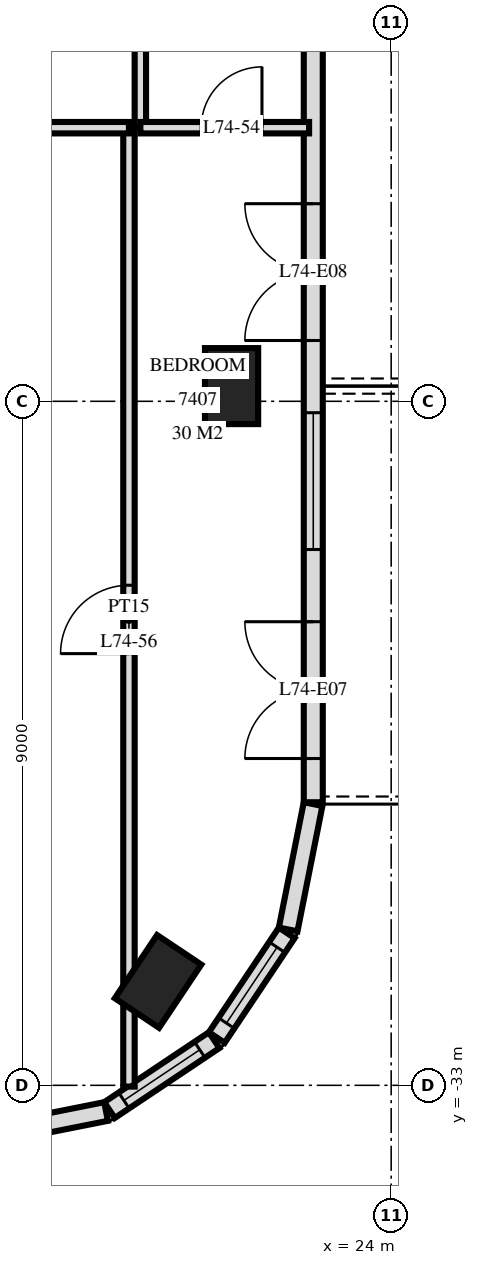
"""IFC4 building model, lengths in metres.
Left out: names, types, materials, properties, quantities, classifications, styles, units other than length and angle.
Written with IfcOpenShell. Run it as: python <this file> out.ifc"""

import sys

from ifc_helpers import new_model, si_unit, direction, frame, frame_2d, origin, origin_2d, place, context, subcontext, project, spatial, rectangle, extrude, element, fill, save


model = new_model("IFC4")
c1 = context("Model", 3, precision=1e-05, world=origin(), true_north=direction((0.0, 1.0)))
c2 = subcontext(c1, "Body", "Model", "MODEL_VIEW")
j1 = project(units=[si_unit("LENGTHUNIT", "METRE"), si_unit("PLANEANGLEUNIT", "RADIAN")], contexts=[c1])
p1 = place(None, origin())
s1 = spatial("IfcSite", under=j1, at=p1, CompositionType="ELEMENT")
p2 = place(p1, origin())
s2 = spatial("IfcBuilding", under=s1, at=p2, CompositionType="ELEMENT")
p3 = place(p2, frame((0.0, 0.0, 280.6)))
s3 = spatial("IfcBuildingStorey", under=s2, at=p3, CompositionType="ELEMENT", Elevation=280.6)
for number, where, z_axis, x_axis in (
    (1, (20.933, -31.633, 0.0), (0.0, 0.0, 1.0), (0.556, 0.831, 0.0)),
    (2, (21.9, -23.8, 0.0), (0.0, 0.0, 1.0), (0.0, 1.0, 0.0)),
):
    element("IfcColumn", number, at=place(p3, frame(where, z_axis=z_axis, x_axis=x_axis)), inside=s3, PredefinedType="COLUMN", context=c2, shape_type="SweptSolid", body=[
        extrude(rectangle(XDim=1.0, YDim=0.7, at=origin_2d()), origin(), (0.0, 0.0, 1.0), 3.5),
    ])
p4 = place(p3, frame((18.6, -33.673, 0.0), z_axis=(0.0, 0.0, 1.0), x_axis=(0.980770110232, 0.195166572128, 0.0)))
e3 = element("IfcWall", 3, at=p4, inside=s3, PredefinedType="SOLIDWALL", context=c2, shape_type="SweptSolid", body=[
    extrude(rectangle(XDim=1.681, YDim=0.25, at=frame_2d((0.841, 0.0))), origin(), (0.0, 0.0, 1.0), 3.22),
])
p5 = place(p3, frame((20.294, -33.326, 0.0), z_axis=(0.0, 0.0, 1.0), x_axis=(0.831482937015, 0.55555029066, 0.0)))
e4 = element("IfcWall", 4, at=p5, inside=s3, PredefinedType="SOLIDWALL", context=c2, shape_type="SweptSolid", body=[
    extrude(rectangle(XDim=1.656, YDim=0.25, at=frame_2d((0.828, 0.0))), origin(), (0.0, 0.0, 1.0), 3.22),
])
p6 = place(p5, frame((0.228, 0.0, 0.9)))
e5 = element("IfcOpeningElement", 5, at=p6, cuts=e4, PredefinedType="OPENING", context=c2, shape_type="SweptSolid", body=[
    extrude(rectangle(XDim=1.2, YDim=1.5, at=frame_2d((0.6, 0.75))), frame((0.0, 0.135, 0.0), z_axis=(0.0, -1.0, 0.0), x_axis=(1.0, 0.0, 0.0)), (0.0, 0.0, 1.0), 0.27),
])
p7 = place(p3, frame((21.706, -32.371, 0.0), z_axis=(0.0, 0.0, 1.0), x_axis=(0.55555029066, 0.831482937015, 0.0)))
e6 = element("IfcWall", 6, at=p7, inside=s3, PredefinedType="SOLIDWALL", context=c2, shape_type="SweptSolid", body=[
    extrude(rectangle(XDim=1.656, YDim=0.25, at=frame_2d((0.828, 0.0))), origin(), (0.0, 0.0, 1.0), 3.22),
])
p8 = place(p7, frame((0.228, 0.0, 0.9)))
e7 = element("IfcOpeningElement", 7, at=p8, cuts=e6, PredefinedType="OPENING", context=c2, shape_type="SweptSolid", body=[
    extrude(rectangle(XDim=1.2, YDim=1.5, at=frame_2d((0.6, 0.75))), frame((0.0, 0.135, 0.0), z_axis=(0.0, -1.0, 0.0), x_axis=(1.0, 0.0, 0.0)), (0.0, 0.0, 1.0), 0.27),
])
p9 = place(p3, frame((22.645, -30.949, 0.0), z_axis=(0.0, 0.0, 1.0), x_axis=(0.19513878023, 0.980775640221, 0.0)))
e8 = element("IfcWall", 8, at=p9, inside=s3, PredefinedType="SOLIDWALL", context=c2, shape_type="SweptSolid", body=[
    extrude(rectangle(XDim=1.681, YDim=0.25, at=frame_2d((0.841, 0.0))), origin(), (0.0, 0.0, 1.0), 3.22),
])
p10 = place(p3, frame((22.975, -29.275, 0.0), z_axis=(0.0, 0.0, 1.0), x_axis=(0.0, 1.0, 0.0)))
e9 = element("IfcWall", 9, at=p10, inside=s3, PredefinedType="SOLIDWALL", context=c2, shape_type="SweptSolid", body=[
    extrude(rectangle(XDim=25.951, YDim=0.25, at=frame_2d((12.975, 0.0))), origin(), (0.0, 0.0, 1.0), 3.22),
])
p11 = place(p10, frame((0.575, 0.0, 0.0)))
e10 = element("IfcOpeningElement", 10, at=p11, cuts=e9, PredefinedType="OPENING", context=c2, shape_type="SweptSolid", body=[
    extrude(rectangle(XDim=1.8, YDim=2.4, at=frame_2d((0.9, 1.2))), frame((0.0, 0.135, 0.0), z_axis=(0.0, -1.0, 0.0), x_axis=(1.0, 0.0, 0.0)), (0.0, 0.0, 1.0), 0.27),
])
p12 = place(p10, frame((3.325, 0.0, 0.9)))
e11 = element("IfcOpeningElement", 11, at=p12, cuts=e9, PredefinedType="OPENING", context=c2, shape_type="SweptSolid", body=[
    extrude(rectangle(XDim=1.8, YDim=1.5, at=frame_2d((0.9, 0.75))), frame((0.0, 0.135, 0.0), z_axis=(0.0, -1.0, 0.0), x_axis=(1.0, 0.0, 0.0)), (0.0, 0.0, 1.0), 0.27),
])
p13 = place(p10, frame((6.075, 0.0, 0.0)))
e12 = element("IfcOpeningElement", 12, at=p13, cuts=e9, PredefinedType="OPENING", context=c2, shape_type="SweptSolid", body=[
    extrude(rectangle(XDim=1.8, YDim=2.4, at=frame_2d((0.9, 1.2))), frame((0.0, 0.135, 0.0), z_axis=(0.0, -1.0, 0.0), x_axis=(1.0, 0.0, 0.0)), (0.0, 0.0, 1.0), 0.27),
])
p14 = place(p10, frame((12.475, 0.0, 0.9)))
e13 = element("IfcOpeningElement", 13, at=p14, cuts=e9, PredefinedType="OPENING", context=c2, shape_type="SweptSolid", body=[
    extrude(rectangle(XDim=1.2, YDim=1.5, at=frame_2d((0.6, 0.75))), frame((0.0, 0.135, 0.0), z_axis=(0.0, -1.0, 0.0), x_axis=(1.0, 0.0, 0.0)), (0.0, 0.0, 1.0), 0.27),
])
p15 = place(p10, frame((16.175, 0.0, 0.0)))
e14 = element("IfcOpeningElement", 14, at=p15, cuts=e9, PredefinedType="OPENING", context=c2, shape_type="SweptSolid", body=[
    extrude(rectangle(XDim=1.8, YDim=2.4, at=frame_2d((0.9, 1.2))), frame((0.0, 0.135, 0.0), z_axis=(0.0, -1.0, 0.0), x_axis=(1.0, 0.0, 0.0)), (0.0, 0.0, 1.0), 0.27),
])
p16 = place(p10, frame((20.925, 0.0, 0.0)))
e15 = element("IfcOpeningElement", 15, at=p16, cuts=e9, PredefinedType="OPENING", context=c2, shape_type="SweptSolid", body=[
    extrude(rectangle(XDim=1.8, YDim=2.4, at=frame_2d((0.9, 1.2))), frame((0.0, 0.135, 0.0), z_axis=(0.0, -1.0, 0.0), x_axis=(1.0, 0.0, 0.0)), (0.0, 0.0, 1.0), 0.27),
])
p17 = place(p3, frame((20.7, -20.4, 0.0), z_axis=(0.0, 0.0, 1.0), x_axis=(0.0, 1.0, 0.0)))
e16 = element("IfcWall", 16, at=p17, inside=s3, PredefinedType="PARTITIONING", context=c2, shape_type="SweptSolid", body=[
    extrude(rectangle(XDim=3.0, YDim=0.15, at=frame_2d((1.5, 0.0))), origin(), (0.0, 0.0, 1.0), 3.22),
])
p18 = place(p3, frame((20.55, -33.017, 0.0), z_axis=(0.0, 0.0, 1.0), x_axis=(0.0, 1.0, 0.0)))
e17 = element("IfcWall", 17, at=p18, inside=s3, PredefinedType="PARTITIONING", context=c2, shape_type="SweptSolid", body=[
    extrude(rectangle(XDim=12.617, YDim=0.15, at=frame_2d((6.308, 0.0))), origin(), (0.0, 0.0, 1.0), 3.22),
])
p19 = place(p18, frame((5.697, 0.0, 0.0)))
e18 = element("IfcOpeningElement", 18, at=p19, cuts=e17, PredefinedType="OPENING", context=c2, shape_type="SweptSolid", body=[
    extrude(rectangle(XDim=0.9, YDim=2.1, at=frame_2d((0.45, 1.05))), frame((0.0, 0.085, 0.0), z_axis=(0.0, -1.0, 0.0), x_axis=(1.0, 0.0, 0.0)), (0.0, 0.0, 1.0), 0.17),
])
p20 = place(p3, frame((16.4, -20.4, 0.0), z_axis=(0.0, 0.0, 1.0), x_axis=(1.0, 0.0, 0.0)))
e19 = element("IfcWall", 19, at=p20, inside=s3, PredefinedType="PARTITIONING", context=c2, shape_type="SweptSolid", body=[
    extrude(rectangle(XDim=4.15, YDim=0.15, at=frame_2d((2.075, 0.0))), origin(), (0.0, 0.0, 1.0), 3.22),
])
p21 = place(p3, frame((20.7, -20.4, 0.0), z_axis=(0.0, 0.0, 1.0), x_axis=(1.0, 0.0, 0.0)))
e20 = element("IfcWall", 20, at=p21, inside=s3, PredefinedType="PARTITIONING", context=c2, shape_type="SweptSolid", body=[
    extrude(rectangle(XDim=2.22, YDim=0.15, at=frame_2d((1.11, 0.0))), origin(), (0.0, 0.0, 1.0), 3.22),
])
p22 = place(p21, frame((0.8, 0.0, 0.0)))
e21 = element("IfcOpeningElement", 21, at=p22, cuts=e20, PredefinedType="OPENING", context=c2, shape_type="SweptSolid", body=[
    extrude(rectangle(XDim=0.8, YDim=2.1, at=frame_2d((0.4, 1.05))), frame((0.0, 0.085, 0.0), z_axis=(0.0, -1.0, 0.0), x_axis=(1.0, 0.0, 0.0)), (0.0, 0.0, 1.0), 0.17),
])
p23 = place(p6, origin())
e22 = element("IfcWindow", 22, at=p23, inside=s3, PartitioningType="SINGLE_PANEL", PredefinedType="WINDOW", context=c2, shape_type="SweptSolid", body=[
    extrude(rectangle(XDim=1.2, YDim=1.5, at=frame_2d((0.6, 0.75))), frame((0.0, 0.03, 0.0), z_axis=(0.0, -1.0, 0.0), x_axis=(1.0, 0.0, 0.0)), (0.0, 0.0, 1.0), 0.06),
])
fill(e5, e22)
p24 = place(p8, origin())
e23 = element("IfcWindow", 23, at=p24, inside=s3, PartitioningType="SINGLE_PANEL", PredefinedType="WINDOW", context=c2, shape_type="SweptSolid", body=[
    extrude(rectangle(XDim=1.2, YDim=1.5, at=frame_2d((0.6, 0.75))), frame((0.0, 0.03, 0.0), z_axis=(0.0, -1.0, 0.0), x_axis=(1.0, 0.0, 0.0)), (0.0, 0.0, 1.0), 0.06),
])
fill(e7, e23)
p25 = place(p11, origin())
e24 = element("IfcDoor", 24, at=p25, inside=s3, OperationType="DOUBLE_DOOR_SINGLE_SWING", PredefinedType="DOOR", context=c2, shape_type="SweptSolid", body=[
    extrude(rectangle(XDim=1.8, YDim=2.4, at=frame_2d((0.9, 1.2))), frame((0.0, 0.025, 0.0), z_axis=(0.0, -1.0, 0.0), x_axis=(1.0, 0.0, 0.0)), (0.0, 0.0, 1.0), 0.05),
])
fill(e10, e24)
p26 = place(p12, origin())
e25 = element("IfcWindow", 25, at=p26, inside=s3, PartitioningType="SINGLE_PANEL", PredefinedType="WINDOW", context=c2, shape_type="SweptSolid", body=[
    extrude(rectangle(XDim=1.8, YDim=1.5, at=frame_2d((0.9, 0.75))), frame((0.0, 0.03, 0.0), z_axis=(0.0, -1.0, 0.0), x_axis=(1.0, 0.0, 0.0)), (0.0, 0.0, 1.0), 0.06),
])
fill(e11, e25)
p27 = place(p13, origin())
e26 = element("IfcDoor", 26, at=p27, inside=s3, OperationType="DOUBLE_DOOR_SINGLE_SWING", PredefinedType="DOOR", context=c2, shape_type="SweptSolid", body=[
    extrude(rectangle(XDim=1.8, YDim=2.4, at=frame_2d((0.9, 1.2))), frame((0.0, 0.025, 0.0), z_axis=(0.0, -1.0, 0.0), x_axis=(1.0, 0.0, 0.0)), (0.0, 0.0, 1.0), 0.05),
])
fill(e12, e26)
p28 = place(p22, origin())
e27 = element("IfcDoor", 27, at=p28, inside=s3, OperationType="SINGLE_SWING_LEFT", PredefinedType="DOOR", context=c2, shape_type="SweptSolid", body=[
    extrude(rectangle(XDim=0.8, YDim=2.1, at=frame_2d((0.4, 1.05))), frame((0.0, 0.025, 0.0), z_axis=(0.0, -1.0, 0.0), x_axis=(1.0, 0.0, 0.0)), (0.0, 0.0, 1.0), 0.05),
])
fill(e21, e27)
p29 = place(p19, origin())
e28 = element("IfcDoor", 28, at=p29, inside=s3, OperationType="SINGLE_SWING_RIGHT", PredefinedType="DOOR", context=c2, shape_type="SweptSolid", body=[
    extrude(rectangle(XDim=0.9, YDim=2.1, at=frame_2d((0.45, 1.05))), frame((0.0, 0.025, 0.0), z_axis=(0.0, -1.0, 0.0), x_axis=(1.0, 0.0, 0.0)), (0.0, 0.0, 1.0), 0.05),
])
fill(e18, e28)
save(model, sys.argv[1])
